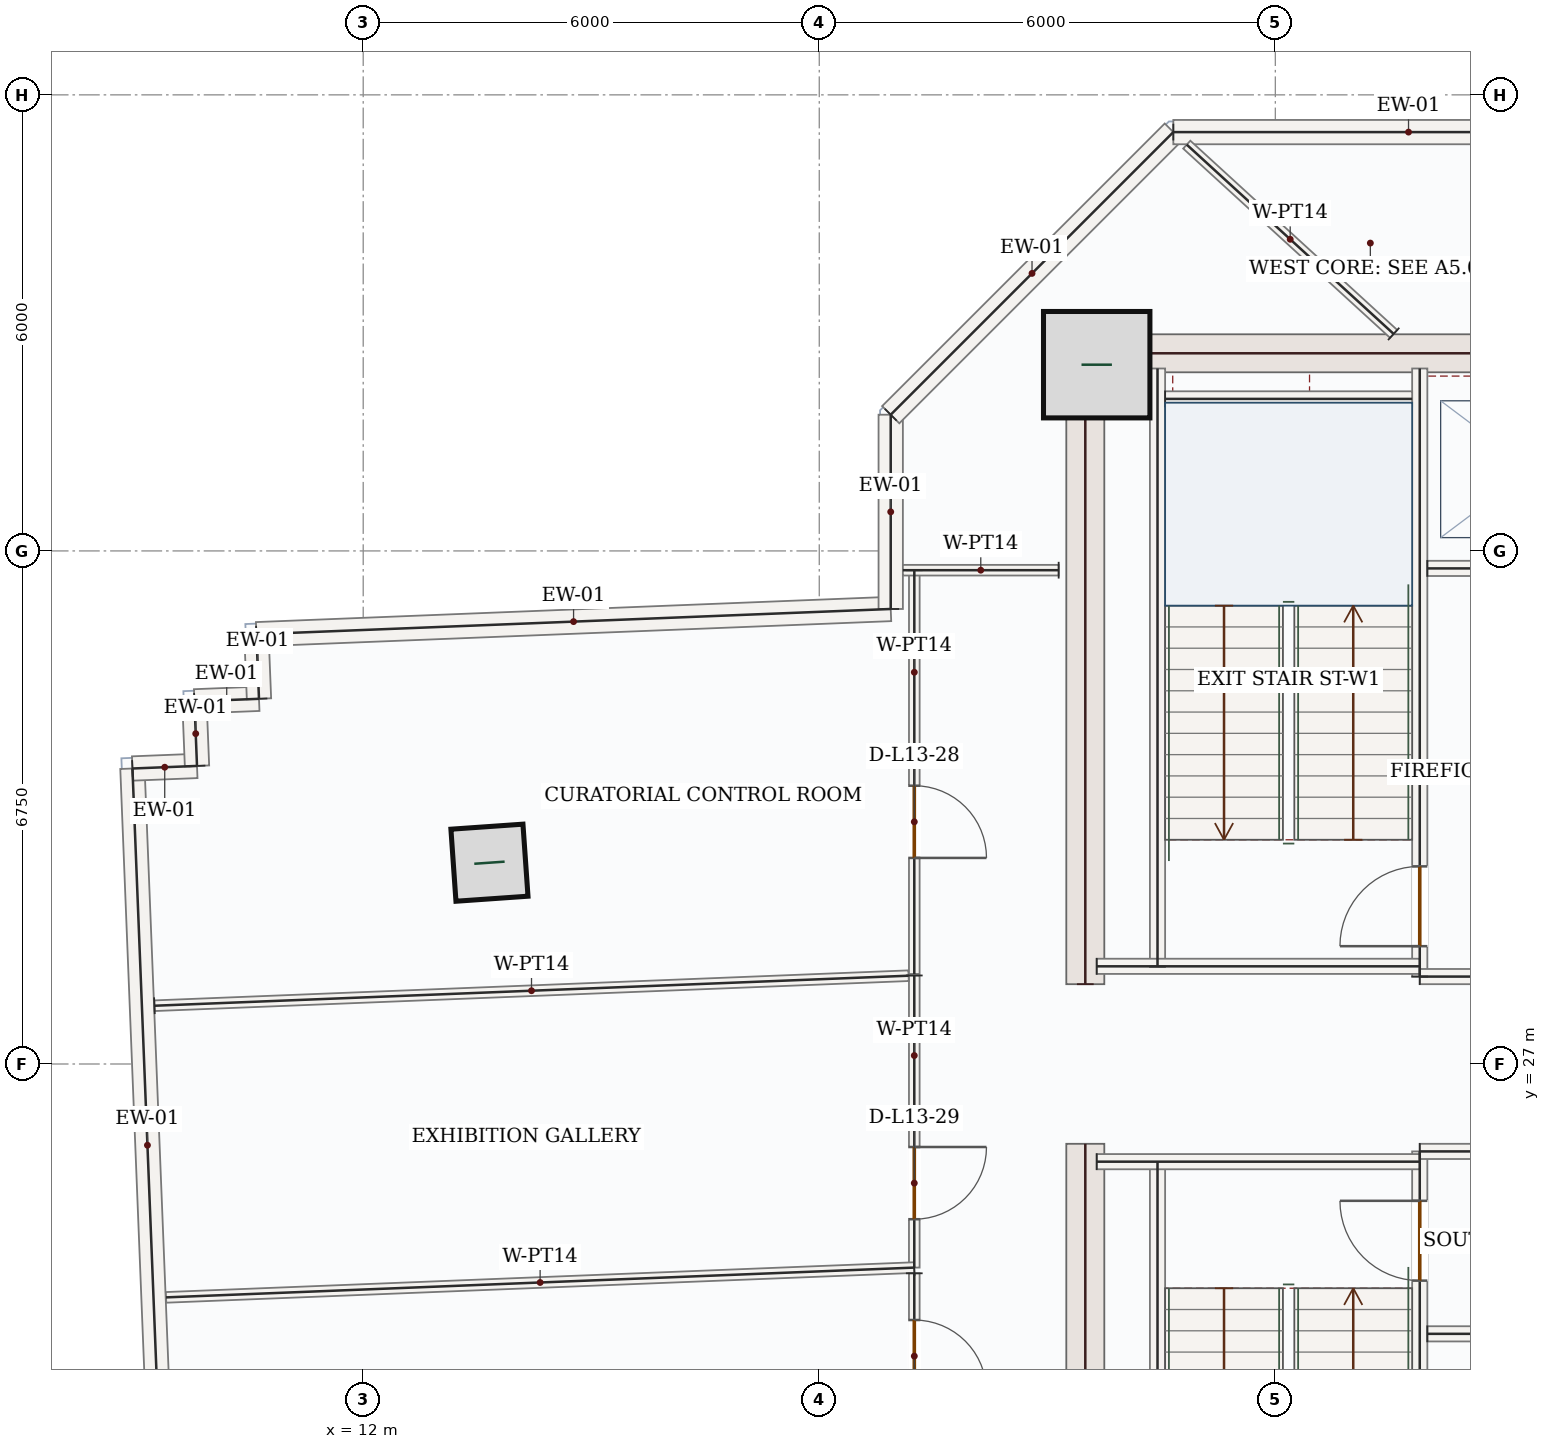
"""IFC4 building model, lengths in metres.
Left out: names, types, materials, properties, quantities, classifications, styles, units other than length and angle.
Written with IfcOpenShell. Run it as: python <this file> out.ifc"""

import sys

from ifc_helpers import new_model, si_unit, direction, frame, frame_2d, origin, origin_2d, place, context, subcontext, project, spatial, rectangle, hollow_rectangle, extrude, source, transform, mapped, element, fill, save


model = new_model("IFC4")
c1 = context("Model", 3, precision=1e-05, world=origin(), true_north=direction((0.0, 1.0)))
c2 = subcontext(c1, "Body", "Model", "MODEL_VIEW")
j1 = project(units=[si_unit("LENGTHUNIT", "METRE"), si_unit("PLANEANGLEUNIT", "RADIAN")], contexts=[c1])
p1 = place(None, origin())
s1 = spatial("IfcSite", under=j1, at=p1, CompositionType="ELEMENT")
p2 = place(p1, origin())
s2 = spatial("IfcBuilding", under=s1, at=p2, CompositionType="ELEMENT")
p3 = place(p2, frame((0.0, 0.0, 62.7)))
s3 = spatial("IfcBuildingStorey", under=s2, at=p3, CompositionType="ELEMENT", Elevation=62.7)
m1 = source(origin(), c2, "Body", "SweptSolid", [
    extrude(rectangle(XDim=8.55, YDim=0.5, at=frame_2d((4.275, 0.0))), origin(), (0.0, 0.0, 1.0), 3.95),
])
for number, where, z_axis, x_axis in (
    (1, (21.5, 17.4, 0.0), (0.0, 0.0, 1.0), (0.0, 1.0, 0.0)),
    (2, (21.5, 28.05, 0.0), (0.0, 0.0, 1.0), (0.0, 1.0, 0.0)),
):
    element("IfcWall", number, at=place(p3, frame(where, z_axis=z_axis, x_axis=x_axis)), inside=s3, PredefinedType="SHEAR", context=c2, shape_type="MappedRepresentation", body=[
        mapped(m1, transform((0.0, 0.0, 0.0), x_axis=(1.0, 0.0, 0.0), y_axis=(0.0, 1.0, 0.0), z_axis=(0.0, 0.0, 1.0), scale=1.0)),
    ])
m2 = source(origin(), c2, "Body", "SweptSolid", [
    extrude(rectangle(XDim=7.0, YDim=0.5, at=frame_2d((3.5, 0.0))), origin(), (0.0, 0.0, 1.0), 3.95),
])
p4 = place(p3, frame((21.75, 36.35, 0.0), z_axis=(0.0, 0.0, 1.0), x_axis=(1.0, 0.0, 0.0)))
e3 = element("IfcWall", 3, at=p4, inside=s3, PredefinedType="SHEAR", context=c2, shape_type="MappedRepresentation", body=[
    mapped(m2, transform((0.0, 0.0, 0.0), x_axis=(1.0, 0.0, 0.0), y_axis=(0.0, 1.0, 0.0), z_axis=(0.0, 0.0, 1.0), scale=1.0)),
])
m3 = source(origin(), c2, "Body", "SweptSolid", [
    extrude(rectangle(XDim=1.4, YDim=1.4, at=origin_2d()), origin(), (0.0, 0.0, 1.0), 4.2),
])
p5 = place(p3, frame((21.65, 36.2, 0.0), z_axis=(0.0, 0.0, 1.0), x_axis=(1.0, 0.0, 0.0)))
e4 = element("IfcColumn", 4, at=p5, inside=s3, PredefinedType="COLUMN", context=c2, shape_type="MappedRepresentation", body=[
    mapped(m3, transform((0.0, 0.0, 0.0), x_axis=(1.0, 0.0, 0.0), y_axis=(0.0, 1.0, 0.0), z_axis=(0.0, 0.0, 1.0), scale=1.0)),
])
m4 = source(origin(), c2, "Body", "SweptSolid", [
    extrude(hollow_rectangle(XDim=0.95, YDim=0.95, WallThickness=0.05, at=origin_2d()), origin(), (0.0, 0.0, 1.0), 4.2),
])
p6 = place(p3, frame((13.661, 29.648, 0.0), z_axis=(0.0, 0.0, 1.0), x_axis=(0.99756405026, 0.069756473744, 0.0)))
e5 = element("IfcColumn", 5, at=p6, inside=s3, PredefinedType="COLUMN", context=c2, shape_type="MappedRepresentation", body=[
    mapped(m4, transform((0.0, 0.0, 0.0), x_axis=(1.0, 0.0, 0.0), y_axis=(0.0, 1.0, 0.0), z_axis=(0.0, 0.0, 1.0), scale=1.0)),
])
m5 = source(origin(), c2, "Body", "SweptSolid", [
    extrude(rectangle(XDim=9.92, YDim=0.32, at=frame_2d((4.96, 0.0))), origin(), (0.0, 0.0, 1.0), 3.95),
])
p7 = place(p3, frame((9.359, 20.975, 0.0), z_axis=(0.0, 0.0, 1.0), x_axis=(-0.03977146366, 0.999208802342, 0.0)))
e6 = element("IfcWall", 6, at=p7, inside=s3, PredefinedType="SOLIDWALL", context=c2, shape_type="MappedRepresentation", body=[
    mapped(m5, transform((0.0, 0.0, 0.0), x_axis=(1.0, 0.0, 0.0), y_axis=(0.0, 1.0, 0.0), z_axis=(0.0, 0.0, 1.0), scale=1.0)),
])
m6 = source(origin(), c2, "Body", "SweptSolid", [
    extrude(rectangle(XDim=0.85, YDim=0.32, at=frame_2d((0.425, 0.0))), origin(), (0.0, 0.0, 1.0), 3.95),
])
p8 = place(p3, frame((8.964, 30.887, 0.0), z_axis=(0.0, 0.0, 1.0), x_axis=(0.999202334929, 0.039933618331, 0.0)))
e7 = element("IfcWall", 7, at=p8, inside=s3, PredefinedType="SOLIDWALL", context=c2, shape_type="MappedRepresentation", body=[
    mapped(m6, transform((0.0, 0.0, 0.0), x_axis=(1.0, 0.0, 0.0), y_axis=(0.0, 1.0, 0.0), z_axis=(0.0, 0.0, 1.0), scale=1.0)),
])
m7 = source(origin(), c2, "Body", "SweptSolid", [
    extrude(rectangle(XDim=0.85, YDim=0.32, at=frame_2d((0.425, 0.0))), origin(), (0.0, 0.0, 1.0), 3.95),
])
for number, where, z_axis, x_axis in (
    (8, (9.813, 30.921, 0.0), (0.0, 0.0, 1.0), (-0.04, 0.999, 0.0)),
    (9, (9.78, 31.771, 0.0), (0.0, 0.0, 1.0), (0.999, 0.04, 0.0)),
    (10, (10.629, 31.804, 0.0), (0.0, 0.0, 1.0), (-0.04, 0.999, 0.0)),
):
    element("IfcWall", number, at=place(p3, frame(where, z_axis=z_axis, x_axis=x_axis)), inside=s3, PredefinedType="SOLIDWALL", context=c2, shape_type="MappedRepresentation", body=[
        mapped(m7, transform((0.0, 0.0, 0.0), x_axis=(1.0, 0.0, 0.0), y_axis=(0.0, 1.0, 0.0), z_axis=(0.0, 0.0, 1.0), scale=1.0)),
    ])
m8 = source(origin(), c2, "Body", "SweptSolid", [
    extrude(rectangle(XDim=8.352, YDim=0.32, at=frame_2d((4.176, 0.0))), origin(), (0.0, 0.0, 1.0), 3.95),
])
p9 = place(p3, frame((10.595, 32.654, 0.0), z_axis=(0.0, 0.0, 1.0), x_axis=(0.999208226989, 0.039785916063, 0.0)))
e11 = element("IfcWall", 11, at=p9, inside=s3, PredefinedType="SOLIDWALL", context=c2, shape_type="MappedRepresentation", body=[
    mapped(m8, transform((0.0, 0.0, 0.0), x_axis=(1.0, 0.0, 0.0), y_axis=(0.0, 1.0, 0.0), z_axis=(0.0, 0.0, 1.0), scale=1.0)),
])
m9 = source(origin(), c2, "Body", "SweptSolid", [
    extrude(rectangle(XDim=2.556, YDim=0.32, at=frame_2d((1.278, 0.0))), origin(), (0.0, 0.0, 1.0), 3.95),
])
p10 = place(p3, frame((18.94, 32.986, 0.0), z_axis=(0.0, 0.0, 1.0), x_axis=(0.0, 1.0, 0.0)))
e12 = element("IfcWall", 12, at=p10, inside=s3, PredefinedType="SOLIDWALL", context=c2, shape_type="MappedRepresentation", body=[
    mapped(m9, transform((0.0, 0.0, 0.0), x_axis=(1.0, 0.0, 0.0), y_axis=(0.0, 1.0, 0.0), z_axis=(0.0, 0.0, 1.0), scale=1.0)),
])
m10 = source(origin(), c2, "Body", "SweptSolid", [
    extrude(rectangle(XDim=5.258, YDim=0.32, at=frame_2d((2.629, 0.0))), origin(), (0.0, 0.0, 1.0), 3.95),
])
p11 = place(p3, frame((18.94, 35.542, 0.0), z_axis=(0.0, 0.0, 1.0), x_axis=(0.707106781187, 0.707106781187, 0.0)))
e13 = element("IfcWall", 13, at=p11, inside=s3, PredefinedType="SOLIDWALL", context=c2, shape_type="MappedRepresentation", body=[
    mapped(m10, transform((0.0, 0.0, 0.0), x_axis=(1.0, 0.0, 0.0), y_axis=(0.0, 1.0, 0.0), z_axis=(0.0, 0.0, 1.0), scale=1.0)),
])
m11 = source(origin(), c2, "Body", "SweptSolid", [
    extrude(rectangle(XDim=6.189, YDim=0.32, at=frame_2d((3.094, 0.0))), origin(), (0.0, 0.0, 1.0), 3.95),
])
p12 = place(p3, frame((22.658, 39.26, 0.0), z_axis=(0.0, 0.0, 1.0), x_axis=(1.0, 0.0, 0.0)))
e14 = element("IfcWall", 14, at=p12, inside=s3, PredefinedType="SOLIDWALL", context=c2, shape_type="MappedRepresentation", body=[
    mapped(m11, transform((0.0, 0.0, 0.0), x_axis=(1.0, 0.0, 0.0), y_axis=(0.0, 1.0, 0.0), z_axis=(0.0, 0.0, 1.0), scale=1.0)),
])
m12 = source(origin(), c2, "Body", "SweptSolid", [
    extrude(rectangle(XDim=7.87, YDim=0.2, at=frame_2d((3.935, 0.0))), origin(), (0.0, 0.0, 1.0), 3.95),
])
for number, where, z_axis, x_axis in (
    (15, (22.45, 17.85, 0.0), (0.0, 0.0, 1.0), (0.0, 1.0, 0.0)),
    (16, (22.45, 28.28, 0.0), (0.0, 0.0, 1.0), (0.0, 1.0, 0.0)),
):
    element("IfcWall", number, at=place(p3, frame(where, z_axis=z_axis, x_axis=x_axis)), inside=s3, PredefinedType="SOLIDWALL", context=c2, shape_type="MappedRepresentation", body=[
        mapped(m12, transform((0.0, 0.0, 0.0), x_axis=(1.0, 0.0, 0.0), y_axis=(0.0, 1.0, 0.0), z_axis=(0.0, 0.0, 1.0), scale=1.0)),
    ])
p13 = place(p3, frame((25.9, 17.85, 0.0), z_axis=(0.0, 0.0, 1.0), x_axis=(0.0, 1.0, 0.0)))
e17 = element("IfcWall", 17, at=p13, inside=s3, PredefinedType="SOLIDWALL", context=c2, shape_type="SweptSolid", body=[
    extrude(rectangle(XDim=8.0, YDim=0.2, at=frame_2d((4.0, 0.0))), origin(), (0.0, 0.0, 1.0), 3.95),
])
p14 = place(p13, frame((6.3, 0.0, 0.0)))
e18 = element("IfcOpeningElement", 18, at=p14, cuts=e17, PredefinedType="OPENING", context=c2, shape_type="SweptSolid", body=[
    extrude(rectangle(XDim=1.05, YDim=2.15, at=frame_2d((0.525, 1.075))), frame((0.0, 0.11, 0.0), z_axis=(0.0, -1.0, 0.0), x_axis=(1.0, 0.0, 0.0)), (0.0, 0.0, 1.0), 0.22),
])
p15 = place(p3, frame((25.9, 28.15, 0.0), z_axis=(0.0, 0.0, 1.0), x_axis=(0.0, 1.0, 0.0)))
e19 = element("IfcWall", 19, at=p15, inside=s3, PredefinedType="SOLIDWALL", context=c2, shape_type="SweptSolid", body=[
    extrude(rectangle(XDim=8.0, YDim=0.2, at=frame_2d((4.0, 0.0))), origin(), (0.0, 0.0, 1.0), 3.95),
])
p16 = place(p15, frame((0.4, 0.0, 0.0)))
e20 = element("IfcOpeningElement", 20, at=p16, cuts=e19, PredefinedType="OPENING", context=c2, shape_type="SweptSolid", body=[
    extrude(rectangle(XDim=1.05, YDim=2.15, at=frame_2d((0.525, 1.075))), frame((0.0, 0.11, 0.0), z_axis=(0.0, -1.0, 0.0), x_axis=(1.0, 0.0, 0.0)), (0.0, 0.0, 1.0), 0.22),
])
m13 = source(origin(), c2, "Body", "SweptSolid", [
    extrude(rectangle(XDim=4.25, YDim=0.2, at=frame_2d((2.125, 0.0))), origin(), (0.0, 0.0, 1.0), 3.95),
])
p17 = place(p3, frame((21.65, 25.715, 0.0), z_axis=(0.0, 0.0, 1.0), x_axis=(1.0, 0.0, 0.0)))
e21 = element("IfcWall", 21, at=p17, inside=s3, PredefinedType="SOLIDWALL", context=c2, shape_type="MappedRepresentation", body=[
    mapped(m13, transform((0.0, 0.0, 0.0), x_axis=(1.0, 0.0, 0.0), y_axis=(0.0, 1.0, 0.0), z_axis=(0.0, 0.0, 1.0), scale=1.0)),
])
m14 = source(origin(), c2, "Body", "SweptSolid", [
    extrude(rectangle(XDim=3.0, YDim=0.2, at=frame_2d((1.5, 0.0))), origin(), (0.0, 0.0, 1.0), 3.95),
])
p18 = place(p3, frame((25.9, 25.85, 0.0), z_axis=(0.0, 0.0, 1.0), x_axis=(1.0, 0.0, 0.0)))
e22 = element("IfcWall", 22, at=p18, inside=s3, PredefinedType="SOLIDWALL", context=c2, shape_type="MappedRepresentation", body=[
    mapped(m14, transform((0.0, 0.0, 0.0), x_axis=(1.0, 0.0, 0.0), y_axis=(0.0, 1.0, 0.0), z_axis=(0.0, 0.0, 1.0), scale=1.0)),
])
p19 = place(p3, frame((21.65, 28.285, 0.0), z_axis=(0.0, 0.0, 1.0), x_axis=(1.0, 0.0, 0.0)))
e23 = element("IfcWall", 23, at=p19, inside=s3, PredefinedType="SOLIDWALL", context=c2, shape_type="MappedRepresentation", body=[
    mapped(m13, transform((0.0, 0.0, 0.0), x_axis=(1.0, 0.0, 0.0), y_axis=(0.0, 1.0, 0.0), z_axis=(0.0, 0.0, 1.0), scale=1.0)),
])
p20 = place(p3, frame((25.9, 28.15, 0.0), z_axis=(0.0, 0.0, 1.0), x_axis=(1.0, 0.0, 0.0)))
e24 = element("IfcWall", 24, at=p20, inside=s3, PredefinedType="SOLIDWALL", context=c2, shape_type="MappedRepresentation", body=[
    mapped(m14, transform((0.0, 0.0, 0.0), x_axis=(1.0, 0.0, 0.0), y_axis=(0.0, 1.0, 0.0), z_axis=(0.0, 0.0, 1.0), scale=1.0)),
])
m15 = source(origin(), c2, "Body", "SweptSolid", [
    extrude(rectangle(XDim=3.25, YDim=0.2, at=frame_2d((1.625, 0.0))), origin(), (0.0, 0.0, 1.0), 3.95),
])
p21 = place(p3, frame((22.55, 35.75, 0.0), z_axis=(0.0, 0.0, 1.0), x_axis=(1.0, 0.0, 0.0)))
e25 = element("IfcWall", 25, at=p21, inside=s3, PredefinedType="SOLIDWALL", context=c2, shape_type="MappedRepresentation", body=[
    mapped(m15, transform((0.0, 0.0, 0.0), x_axis=(1.0, 0.0, 0.0), y_axis=(0.0, 1.0, 0.0), z_axis=(0.0, 0.0, 1.0), scale=1.0)),
])
p22 = place(p3, frame((26.0, 33.52, 0.0), z_axis=(0.0, 0.0, 1.0), x_axis=(1.0, 0.0, 0.0)))
e26 = element("IfcWall", 26, at=p22, inside=s3, PredefinedType="SOLIDWALL", context=c2, shape_type="SweptSolid", body=[
    extrude(rectangle(XDim=2.75, YDim=0.2, at=frame_2d((1.375, 0.0))), origin(), (0.0, 0.0, 1.0), 3.95),
])
p23 = place(p22, frame((0.82, 0.0, 0.0)))
e27 = element("IfcOpeningElement", 27, at=p23, cuts=e26, PredefinedType="OPENING", context=c2, shape_type="SweptSolid", body=[
    extrude(rectangle(XDim=1.1, YDim=2.15, at=frame_2d((0.55, 1.075))), frame((0.0, 0.11, 0.0), z_axis=(0.0, -1.0, 0.0), x_axis=(1.0, 0.0, 0.0)), (0.0, 0.0, 1.0), 0.22),
])
m16 = source(origin(), c2, "Body", "SweptSolid", [
    extrude(rectangle(XDim=2.75, YDim=0.2, at=frame_2d((1.375, 0.0))), origin(), (0.0, 0.0, 1.0), 3.95),
])
p24 = place(p3, frame((26.0, 23.45, 0.0), z_axis=(0.0, 0.0, 1.0), x_axis=(1.0, 0.0, 0.0)))
e28 = element("IfcWall", 28, at=p24, inside=s3, PredefinedType="SOLIDWALL", context=c2, shape_type="MappedRepresentation", body=[
    mapped(m16, transform((0.0, 0.0, 0.0), x_axis=(1.0, 0.0, 0.0), y_axis=(0.0, 1.0, 0.0), z_axis=(0.0, 0.0, 1.0), scale=1.0)),
])
p25 = place(p3, frame((19.25, 28.165, 0.0), z_axis=(0.0, 0.0, 1.0), x_axis=(0.0, -1.0, 0.0)))
e29 = element("IfcWall", 29, at=p25, inside=s3, PredefinedType="PARTITIONING", context=c2, shape_type="SweptSolid", body=[
    extrude(rectangle(XDim=3.843, YDim=0.14, at=frame_2d((1.921, 0.0))), origin(), (0.0, 0.0, 1.0), 3.95),
])
p26 = place(p25, frame((2.257, 0.0, 0.0)))
e30 = element("IfcOpeningElement", 30, at=p26, cuts=e29, PredefinedType="OPENING", context=c2, shape_type="SweptSolid", body=[
    extrude(rectangle(XDim=0.95, YDim=2.15, at=frame_2d((0.475, 1.075))), frame((0.0, 0.08, 0.0), z_axis=(0.0, -1.0, 0.0), x_axis=(1.0, 0.0, 0.0)), (0.0, 0.0, 1.0), 0.16),
])
m17 = source(origin(), c2, "Body", "SweptSolid", [
    extrude(rectangle(XDim=9.851, YDim=0.14, at=frame_2d((4.925, 0.0))), origin(), (0.0, 0.0, 1.0), 3.95),
])
p27 = place(p3, frame((19.249, 24.322, 0.0), z_axis=(0.0, 0.0, 1.0), x_axis=(-0.999208542072, -0.039778002084, 0.0)))
e31 = element("IfcWall", 31, at=p27, inside=s3, PredefinedType="PARTITIONING", context=c2, shape_type="MappedRepresentation", body=[
    mapped(m17, transform((0.0, 0.0, 0.0), x_axis=(1.0, 0.0, 0.0), y_axis=(0.0, 1.0, 0.0), z_axis=(0.0, 0.0, 1.0), scale=1.0)),
])
m18 = source(origin(), c2, "Body", "SweptSolid", [
    extrude(rectangle(XDim=9.929, YDim=0.14, at=frame_2d((4.965, 0.0))), origin(), (0.0, 0.0, 1.0), 3.95),
])
p28 = place(p3, frame((9.253, 27.767, 0.0), z_axis=(0.0, 0.0, 1.0), x_axis=(0.999208364847, 0.039782453661, 0.0)))
e32 = element("IfcWall", 32, at=p28, inside=s3, PredefinedType="PARTITIONING", context=c2, shape_type="MappedRepresentation", body=[
    mapped(m18, transform((0.0, 0.0, 0.0), x_axis=(1.0, 0.0, 0.0), y_axis=(0.0, 1.0, 0.0), z_axis=(0.0, 0.0, 1.0), scale=1.0)),
])
m19 = source(origin(), c2, "Body", "SweptSolid", [
    extrude(rectangle(XDim=3.689, YDim=0.14, at=frame_2d((1.844, 0.0))), origin(), (0.0, 0.0, 1.0), 3.95),
])
p29 = place(p3, frame((25.557, 36.605, 0.0), z_axis=(0.0, 0.0, 1.0), x_axis=(-0.737843279395, 0.674972069831, 0.0)))
e33 = element("IfcWall", 33, at=p29, inside=s3, PredefinedType="PARTITIONING", context=c2, shape_type="MappedRepresentation", body=[
    mapped(m19, transform((0.0, 0.0, 0.0), x_axis=(1.0, 0.0, 0.0), y_axis=(0.0, 1.0, 0.0), z_axis=(0.0, 0.0, 1.0), scale=1.0)),
])
p30 = place(p3, frame((19.25, 33.496, 0.0), z_axis=(0.0, 0.0, 1.0), x_axis=(-9.1924438e-05, -0.999999995775, 0.0)))
e34 = element("IfcWall", 34, at=p30, inside=s3, PredefinedType="PARTITIONING", context=c2, shape_type="SweptSolid", body=[
    extrude(rectangle(XDim=5.312, YDim=0.14, at=frame_2d((2.656, 0.0))), origin(), (0.0, 0.0, 1.0), 3.95),
])
p31 = place(p30, frame((2.835, 0.0, 0.0)))
e35 = element("IfcOpeningElement", 35, at=p31, cuts=e34, PredefinedType="OPENING", context=c2, shape_type="SweptSolid", body=[
    extrude(rectangle(XDim=0.95, YDim=2.15, at=frame_2d((0.475, 1.075))), frame((0.0, 0.08, 0.0), z_axis=(0.0, -1.0, 0.0), x_axis=(1.0, 0.0, 0.0)), (0.0, 0.0, 1.0), 0.16),
])
m20 = source(origin(), c2, "Body", "SweptSolid", [
    extrude(rectangle(XDim=2.049, YDim=0.14, at=frame_2d((1.025, 0.0))), origin(), (0.0, 0.0, 1.0), 3.95),
])
p32 = place(p3, frame((21.149, 33.497, 0.0), z_axis=(0.0, 0.0, 1.0), x_axis=(-0.999999992904, -0.000119132713, 0.0)))
e36 = element("IfcWall", 36, at=p32, inside=s3, PredefinedType="PARTITIONING", context=c2, shape_type="MappedRepresentation", body=[
    mapped(m20, transform((0.0, 0.0, 0.0), x_axis=(1.0, 0.0, 0.0), y_axis=(0.0, 1.0, 0.0), z_axis=(0.0, 0.0, 1.0), scale=1.0)),
])
p33 = place(p3, frame((19.25, 24.247, 0.0), z_axis=(0.0, 0.0, 1.0), x_axis=(0.000326008981, -0.999999946859, 0.0)))
e37 = element("IfcWall", 37, at=p33, inside=s3, PredefinedType="PARTITIONING", context=c2, shape_type="SweptSolid", body=[
    extrude(rectangle(XDim=3.744, YDim=0.14, at=frame_2d((1.872, 0.0))), origin(), (0.0, 0.0, 1.0), 3.95),
])
p34 = place(p33, frame((0.615, 0.0, 0.0)))
e38 = element("IfcOpeningElement", 38, at=p34, cuts=e37, PredefinedType="OPENING", context=c2, shape_type="SweptSolid", body=[
    extrude(rectangle(XDim=0.95, YDim=2.15, at=frame_2d((0.475, 1.075))), frame((0.0, 0.08, 0.0), z_axis=(0.0, -1.0, 0.0), x_axis=(1.0, 0.0, 0.0)), (0.0, 0.0, 1.0), 0.16),
])
m21 = source(origin(), c2, "Body", "SweptSolid", [
    extrude(rectangle(XDim=1.05, YDim=2.15, at=frame_2d((0.525, 1.075))), frame((0.0, 0.025, 0.0), z_axis=(0.0, -1.0, 0.0), x_axis=(1.0, 0.0, 0.0)), (0.0, 0.0, 1.0), 0.05),
])
p35 = place(p16, origin())
e39 = element("IfcDoor", 39, at=p35, inside=s3, OperationType="SINGLE_SWING_LEFT", PredefinedType="DOOR", context=c2, shape_type="MappedRepresentation", body=[
    mapped(m21, transform((0.0, 0.0, 0.0), x_axis=(1.0, 0.0, 0.0), y_axis=(0.0, 1.0, 0.0), z_axis=(0.0, 0.0, 1.0), scale=1.0)),
])
fill(e20, e39)
p36 = place(p14, origin())
e40 = element("IfcDoor", 40, at=p36, inside=s3, OperationType="SINGLE_SWING_RIGHT", PredefinedType="DOOR", context=c2, shape_type="MappedRepresentation", body=[
    mapped(m21, transform((0.0, 0.0, 0.0), x_axis=(1.0, 0.0, 0.0), y_axis=(0.0, 1.0, 0.0), z_axis=(0.0, 0.0, 1.0), scale=1.0)),
])
fill(e18, e40)
m22 = source(origin(), c2, "Body", "SweptSolid", [
    extrude(rectangle(XDim=0.95, YDim=2.15, at=frame_2d((0.475, 1.075))), frame((0.0, 0.025, 0.0), z_axis=(0.0, -1.0, 0.0), x_axis=(1.0, 0.0, 0.0)), (0.0, 0.0, 1.0), 0.05),
])
p37 = place(p31, origin())
e41 = element("IfcDoor", 41, at=p37, inside=s3, OperationType="SINGLE_SWING_RIGHT", PredefinedType="DOOR", context=c2, shape_type="MappedRepresentation", body=[
    mapped(m22, transform((0.0, 0.0, 0.0), x_axis=(1.0, 0.0, 0.0), y_axis=(0.0, 1.0, 0.0), z_axis=(0.0, 0.0, 1.0), scale=1.0)),
])
fill(e35, e41)
p38 = place(p26, origin())
e42 = element("IfcDoor", 42, at=p38, inside=s3, OperationType="SINGLE_SWING_LEFT", PredefinedType="DOOR", context=c2, shape_type="MappedRepresentation", body=[
    mapped(m22, transform((0.0, 0.0, 0.0), x_axis=(1.0, 0.0, 0.0), y_axis=(0.0, 1.0, 0.0), z_axis=(0.0, 0.0, 1.0), scale=1.0)),
])
fill(e30, e42)
p39 = place(p34, origin())
e43 = element("IfcDoor", 43, at=p39, inside=s3, OperationType="SINGLE_SWING_RIGHT", PredefinedType="DOOR", context=c2, shape_type="MappedRepresentation", body=[
    mapped(m22, transform((0.0, 0.0, 0.0), x_axis=(1.0, 0.0, 0.0), y_axis=(0.0, 1.0, 0.0), z_axis=(0.0, 0.0, 1.0), scale=1.0)),
])
fill(e38, e43)
save(model, sys.argv[1])
